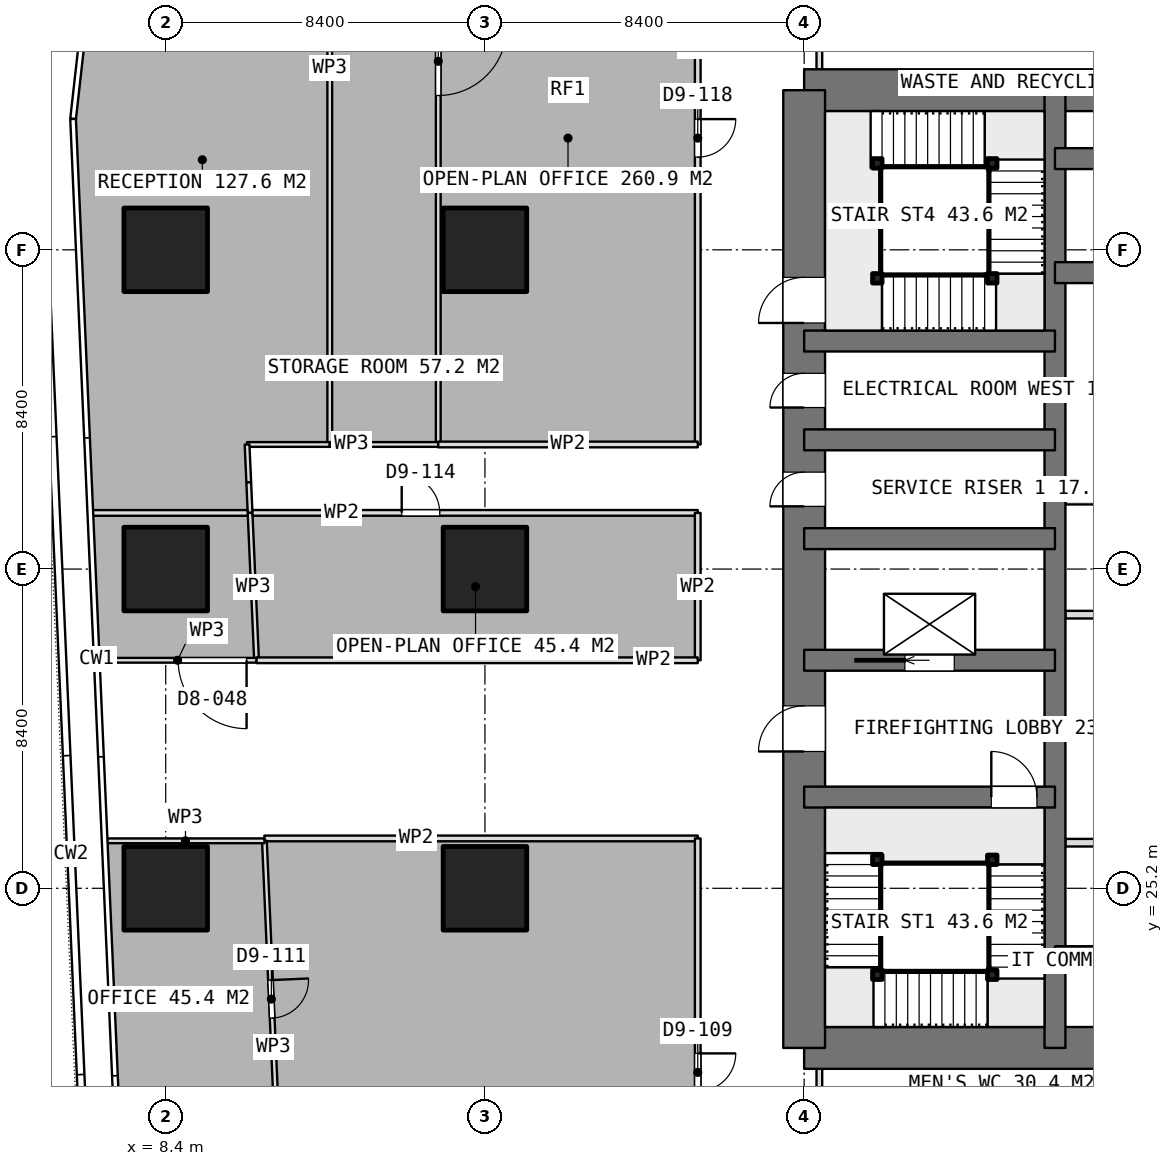
"""IFC4 building model, lengths in metres.
Left out: names, types, materials, properties, quantities, classifications, styles, units other than length and angle.
Written with IfcOpenShell. Run it as: python <this file> out.ifc"""

import sys

from ifc_helpers import new_model, si_unit, direction, frame, frame_2d, origin, origin_2d, place, context, subcontext, project, spatial, rectangle, extrude, element, fill, save


model = new_model("IFC4")
c1 = context("Model", 3, precision=1e-05, world=origin(), true_north=direction((0.0, 1.0)))
c2 = subcontext(c1, "Body", "Model", "MODEL_VIEW")
j1 = project(units=[si_unit("LENGTHUNIT", "METRE"), si_unit("PLANEANGLEUNIT", "RADIAN")], contexts=[c1])
p1 = place(None, origin())
s1 = spatial("IfcSite", under=j1, at=p1, CompositionType="ELEMENT")
p2 = place(p1, origin())
s2 = spatial("IfcBuilding", under=s1, at=p2, CompositionType="ELEMENT")
p3 = place(p2, frame((0.0, 0.0, 44.15)))
s3 = spatial("IfcBuildingStorey", under=s2, at=p3, CompositionType="ELEMENT", Elevation=44.15)
for number, where, z_axis, x_axis in (
    (1, (25.2, 21.0, 0.0), (0.0, 0.0, 1.0), (1.0, 0.0, 0.0)),
    (2, (25.2, 46.2, 0.0), (0.0, 0.0, 1.0), (1.0, 0.0, 0.0)),
):
    element("IfcWall", number, at=place(p3, frame(where, z_axis=z_axis, x_axis=x_axis)), inside=s3, PredefinedType="SHEAR", context=c2, shape_type="SweptSolid", body=[
        extrude(rectangle(XDim=10.4, YDim=1.1, at=frame_2d((5.2, 0.0))), origin(), (0.0, 0.0, 1.0), 3.75),
    ])
p4 = place(p3, frame((25.2, 21.0, 0.0), z_axis=(0.0, 0.0, 1.0), x_axis=(0.0, 1.0, 0.0)))
e3 = element("IfcWall", 3, at=p4, inside=s3, PredefinedType="SHEAR", context=c2, shape_type="SweptSolid", body=[
    extrude(rectangle(XDim=25.2, YDim=1.1, at=frame_2d((12.6, 0.0))), origin(), (0.0, 0.0, 1.0), 3.75),
])
p5 = place(p4, frame((7.8, 0.0, 0.0)))
e4 = element("IfcOpeningElement", 4, at=p5, cuts=e3, PredefinedType="OPENING", context=c2, shape_type="SweptSolid", body=[
    extrude(rectangle(XDim=1.2, YDim=2.1, at=frame_2d((0.6, 1.05))), frame((0.0, 0.56, 0.0), z_axis=(0.0, -1.0, 0.0), x_axis=(1.0, 0.0, 0.0)), (0.0, 0.0, 1.0), 1.12),
])
p6 = place(p4, frame((14.25, 0.0, 0.0)))
e5 = element("IfcOpeningElement", 5, at=p6, cuts=e3, PredefinedType="OPENING", context=c2, shape_type="SweptSolid", body=[
    extrude(rectangle(XDim=0.9, YDim=2.1, at=frame_2d((0.45, 1.05))), frame((0.0, 0.56, 0.0), z_axis=(0.0, -1.0, 0.0), x_axis=(1.0, 0.0, 0.0)), (0.0, 0.0, 1.0), 1.12),
])
p7 = place(p4, frame((16.85, 0.0, 0.0)))
e6 = element("IfcOpeningElement", 6, at=p7, cuts=e3, PredefinedType="OPENING", context=c2, shape_type="SweptSolid", body=[
    extrude(rectangle(XDim=0.9, YDim=2.1, at=frame_2d((0.45, 1.05))), frame((0.0, 0.56, 0.0), z_axis=(0.0, -1.0, 0.0), x_axis=(1.0, 0.0, 0.0)), (0.0, 0.0, 1.0), 1.12),
])
p8 = place(p4, frame((19.075, 0.0, 0.0)))
e7 = element("IfcOpeningElement", 7, at=p8, cuts=e3, PredefinedType="OPENING", context=c2, shape_type="SweptSolid", body=[
    extrude(rectangle(XDim=1.2, YDim=2.1, at=frame_2d((0.6, 1.05))), frame((0.0, 0.56, 0.0), z_axis=(0.0, -1.0, 0.0), x_axis=(1.0, 0.0, 0.0)), (0.0, 0.0, 1.0), 1.12),
])
p9 = place(p3, frame((31.8, 21.0, 0.0), z_axis=(0.0, 0.0, 1.0), x_axis=(0.0, 1.0, 0.0)))
e8 = element("IfcWall", 8, at=p9, inside=s3, PredefinedType="SHEAR", context=c2, shape_type="SweptSolid", body=[
    extrude(rectangle(XDim=25.2, YDim=0.55, at=frame_2d((12.6, 0.0))), origin(), (0.0, 0.0, 1.0), 3.75),
])
for number, where, z_axis, x_axis in (
    (9, (31.8, 23.4, 0.0), (0.0, 0.0, 1.0), (1.0, 0.0, 0.0)),
    (10, (31.8, 41.4, 0.0), (0.0, 0.0, 1.0), (1.0, 0.0, 0.0)),
    (11, (31.8, 44.4, 0.0), (0.0, 0.0, 1.0), (1.0, 0.0, 0.0)),
):
    element("IfcWall", number, at=place(p3, frame(where, z_axis=z_axis, x_axis=x_axis)), inside=s3, PredefinedType="SHEAR", context=c2, shape_type="SweptSolid", body=[
        extrude(rectangle(XDim=3.8, YDim=0.55, at=frame_2d((1.9, 0.0))), origin(), (0.0, 0.0, 1.0), 3.75),
    ])
p10 = place(p3, frame((25.2, 27.6, 0.0), z_axis=(0.0, 0.0, 1.0), x_axis=(1.0, 0.0, 0.0)))
e12 = element("IfcWall", 12, at=p10, inside=s3, PredefinedType="SHEAR", context=c2, shape_type="SweptSolid", body=[
    extrude(rectangle(XDim=6.6, YDim=0.55, at=frame_2d((3.3, 0.0))), origin(), (0.0, 0.0, 1.0), 3.75),
])
p11 = place(p10, frame((4.925, 0.0, 0.0)))
e13 = element("IfcOpeningElement", 13, at=p11, cuts=e12, PredefinedType="OPENING", context=c2, shape_type="SweptSolid", body=[
    extrude(rectangle(XDim=1.2, YDim=2.1, at=frame_2d((0.6, 1.05))), frame((0.0, 0.285, 0.0), z_axis=(0.0, -1.0, 0.0), x_axis=(1.0, 0.0, 0.0)), (0.0, 0.0, 1.0), 0.57),
])
p12 = place(p3, frame((25.2, 31.2, 0.0), z_axis=(0.0, 0.0, 1.0), x_axis=(1.0, 0.0, 0.0)))
e14 = element("IfcWall", 14, at=p12, inside=s3, PredefinedType="SHEAR", context=c2, shape_type="SweptSolid", body=[
    extrude(rectangle(XDim=6.6, YDim=0.55, at=frame_2d((3.3, 0.0))), origin(), (0.0, 0.0, 1.0), 3.75),
])
p13 = place(p12, frame((2.65, 0.0, 0.0)))
e15 = element("IfcOpeningElement", 15, at=p13, cuts=e14, PredefinedType="OPENING", context=c2, shape_type="SweptSolid", body=[
    extrude(rectangle(XDim=1.3, YDim=2.1, at=frame_2d((0.65, 1.05))), frame((0.0, 0.285, 0.0), z_axis=(0.0, -1.0, 0.0), x_axis=(1.0, 0.0, 0.0)), (0.0, 0.0, 1.0), 0.57),
])
for number, where, z_axis, x_axis in (
    (16, (25.2, 34.4, 0.0), (0.0, 0.0, 1.0), (1.0, 0.0, 0.0)),
    (17, (25.2, 37.0, 0.0), (0.0, 0.0, 1.0), (1.0, 0.0, 0.0)),
    (18, (25.2, 39.6, 0.0), (0.0, 0.0, 1.0), (1.0, 0.0, 0.0)),
):
    element("IfcWall", number, at=place(p3, frame(where, z_axis=z_axis, x_axis=x_axis)), inside=s3, PredefinedType="SHEAR", context=c2, shape_type="SweptSolid", body=[
        extrude(rectangle(XDim=6.6, YDim=0.55, at=frame_2d((3.3, 0.0))), origin(), (0.0, 0.0, 1.0), 3.75),
    ])
for number, where, z_axis, x_axis in (
    (19, (8.4, 25.2, 0.0), (0.0, 0.0, 1.0), (1.0, 0.0, 0.0)),
    (20, (8.4, 33.6, 0.0), (0.0, 0.0, 1.0), (1.0, 0.0, 0.0)),
    (21, (8.4, 42.0, 0.0), (0.0, 0.0, 1.0), (1.0, 0.0, 0.0)),
    (22, (16.8, 25.2, 0.0), (0.0, 0.0, 1.0), (1.0, 0.0, 0.0)),
    (23, (16.8, 33.6, 0.0), (0.0, 0.0, 1.0), (1.0, 0.0, 0.0)),
    (24, (16.8, 42.0, 0.0), (0.0, 0.0, 1.0), (1.0, 0.0, 0.0)),
):
    element("IfcColumn", number, at=place(p3, frame(where, z_axis=z_axis, x_axis=x_axis)), inside=s3, PredefinedType="COLUMN", context=c2, shape_type="SweptSolid", body=[
        extrude(rectangle(XDim=2.2, YDim=2.2, at=origin_2d()), origin(), (0.0, 0.0, 1.0), 3.75),
    ])
for number, where, z_axis, x_axis in (
    (25, (32.075, 26.4, 0.0), (0.0, 0.0, 1.0), (1.0, 0.0, 0.0)),
    (26, (32.075, 29.4, 0.0), (0.0, 0.0, 1.0), (1.0, 0.0, 0.0)),
    (27, (32.075, 32.4, 0.0), (0.0, 0.0, 1.0), (1.0, 0.0, 0.0)),
    (28, (32.075, 35.4, 0.0), (0.0, 0.0, 1.0), (1.0, 0.0, 0.0)),
    (29, (32.075, 38.4, 0.0), (0.0, 0.0, 1.0), (1.0, 0.0, 0.0)),
):
    element("IfcWall", number, at=place(p3, frame(where, z_axis=z_axis, x_axis=x_axis)), inside=s3, PredefinedType="PARTITIONING", context=c2, shape_type="SweptSolid", body=[
        extrude(rectangle(XDim=3.25, YDim=0.2, at=frame_2d((1.625, 0.0))), origin(), (0.0, 0.0, 1.0), 3.5),
    ])
for number, where, z_axis, x_axis in (
    (30, (25.6, 46.75, 0.0), (0.0, 0.0, 1.0), (0.0, 1.0, 0.0)),
    (31, (25.6, 17.875, 0.0), (0.0, 0.0, 1.0), (0.0, 1.0, 0.0)),
):
    element("IfcWall", number, at=place(p3, frame(where, z_axis=z_axis, x_axis=x_axis)), inside=s3, PredefinedType="PARTITIONING", context=c2, shape_type="SweptSolid", body=[
        extrude(rectangle(XDim=2.575, YDim=0.15, at=frame_2d((1.288, 0.0))), origin(), (0.0, 0.0, 1.0), 3.5),
    ])
p14 = place(p3, frame((12.717, 56.705, 0.0), z_axis=(0.0, 0.0, 1.0), x_axis=(0.0, -1.0, 0.0)))
e32 = element("IfcWall", 32, at=p14, inside=s3, PredefinedType="PARTITIONING", context=c2, shape_type="SweptSolid", body=[
    extrude(rectangle(XDim=19.827, YDim=0.125, at=frame_2d((9.914, 0.0))), origin(), (0.0, 0.0, 1.0), 3.5),
])
p15 = place(p3, frame((12.717, 36.878, 0.0), z_axis=(0.0, 0.0, 1.0), x_axis=(-1.0, 0.0, 0.0)))
e33 = element("IfcWall", 33, at=p15, inside=s3, PredefinedType="PARTITIONING", context=c2, shape_type="SweptSolid", body=[
    extrude(rectangle(XDim=2.176, YDim=0.125, at=frame_2d((1.088, 0.0))), origin(), (0.0, 0.0, 1.0), 3.5),
])
p16 = place(p3, frame((10.541, 36.878, 0.0), z_axis=(0.0, 0.0, 1.0), x_axis=(0.0440424538, -0.999029660352, 0.0)))
e34 = element("IfcWall", 34, at=p16, inside=s3, PredefinedType="PARTITIONING", context=c2, shape_type="SweptSolid", body=[
    extrude(rectangle(XDim=0.998, YDim=0.125, at=frame_2d((0.499, 0.0))), origin(), (0.0, 0.0, 1.0), 3.5),
])
p17 = place(p3, frame((10.585, 35.881, 0.0), z_axis=(0.0, 0.0, 1.0), x_axis=(0.043793560627, -0.999040601801, 0.0)))
e35 = element("IfcWall", 35, at=p17, inside=s3, PredefinedType="PARTITIONING", context=c2, shape_type="SweptSolid", body=[
    extrude(rectangle(XDim=0.803, YDim=0.125, at=frame_2d((0.401, 0.0))), origin(), (0.0, 0.0, 1.0), 3.5),
])
p18 = place(p3, frame((10.62, 35.079, 0.0), z_axis=(0.0, 0.0, 1.0), x_axis=(0.043761924835, -0.999041988074, 0.0)))
e36 = element("IfcWall", 36, at=p18, inside=s3, PredefinedType="PARTITIONING", context=c2, shape_type="SweptSolid", body=[
    extrude(rectangle(XDim=3.883, YDim=0.125, at=frame_2d((1.941, 0.0))), origin(), (0.0, 0.0, 1.0), 3.5),
])
p19 = place(p3, frame((10.79, 31.2, 0.0), z_axis=(0.0, 0.0, 1.0), x_axis=(-1.0, 0.0, 0.0)))
e37 = element("IfcWall", 37, at=p19, inside=s3, PredefinedType="PARTITIONING", context=c2, shape_type="SweptSolid", body=[
    extrude(rectangle(XDim=4.155, YDim=0.125, at=frame_2d((2.078, 0.0))), origin(), (0.0, 0.0, 1.0), 3.5),
])
p20 = place(p19, frame((0.262, 0.0, 0.0)))
e38 = element("IfcOpeningElement", 38, at=p20, cuts=e37, PredefinedType="OPENING", context=c2, shape_type="SweptSolid", body=[
    extrude(rectangle(XDim=1.8, YDim=2.1, at=frame_2d((0.9, 1.05))), frame((0.0, 0.073, 0.0), z_axis=(0.0, -1.0, 0.0), x_axis=(1.0, 0.0, 0.0)), (0.0, 0.0, 1.0), 0.145),
])
p21 = place(p3, frame((15.572, 57.043, 0.0), z_axis=(0.0, 0.0, 1.0), x_axis=(0.0, -1.0, 0.0)))
e39 = element("IfcWall", 39, at=p21, inside=s3, PredefinedType="PARTITIONING", context=c2, shape_type="SweptSolid", body=[
    extrude(rectangle(XDim=20.165, YDim=0.125, at=frame_2d((10.083, 0.0))), origin(), (0.0, 0.0, 1.0), 3.5),
])
p22 = place(p21, frame((9.183, 0.0, 0.0)))
e40 = element("IfcOpeningElement", 40, at=p22, cuts=e39, PredefinedType="OPENING", context=c2, shape_type="SweptSolid", body=[
    extrude(rectangle(XDim=1.8, YDim=2.1, at=frame_2d((0.9, 1.05))), frame((0.0, 0.073, 0.0), z_axis=(0.0, -1.0, 0.0), x_axis=(1.0, 0.0, 0.0)), (0.0, 0.0, 1.0), 0.145),
])
p23 = place(p3, frame((15.572, 36.878, 0.0), z_axis=(0.0, 0.0, 1.0), x_axis=(-1.0, 0.0, 0.0)))
e41 = element("IfcWall", 41, at=p23, inside=s3, PredefinedType="PARTITIONING", context=c2, shape_type="SweptSolid", body=[
    extrude(rectangle(XDim=2.855, YDim=0.125, at=frame_2d((1.427, 0.0))), origin(), (0.0, 0.0, 1.0), 3.5),
])
p24 = place(p3, frame((22.4, 53.0, 0.0), z_axis=(0.0, 0.0, 1.0), x_axis=(0.0, -1.0, 0.0)))
e42 = element("IfcWall", 42, at=p24, inside=s3, PredefinedType="PARTITIONING", context=c2, shape_type="SweptSolid", body=[
    extrude(rectangle(XDim=16.122, YDim=0.15, at=frame_2d((8.061, 0.0))), origin(), (0.0, 0.0, 1.0), 3.5),
])
p25 = place(p24, frame((7.561, 0.0, 0.0)))
e43 = element("IfcOpeningElement", 43, at=p25, cuts=e42, PredefinedType="OPENING", context=c2, shape_type="SweptSolid", body=[
    extrude(rectangle(XDim=1.0, YDim=2.1, at=frame_2d((0.5, 1.05))), frame((0.0, 0.085, 0.0), z_axis=(0.0, -1.0, 0.0), x_axis=(1.0, 0.0, 0.0)), (0.0, 0.0, 1.0), 0.17),
])
p26 = place(p3, frame((22.4, 36.878, 0.0), z_axis=(0.0, 0.0, 1.0), x_axis=(-1.0, 0.0, 0.0)))
e44 = element("IfcWall", 44, at=p26, inside=s3, PredefinedType="PARTITIONING", context=c2, shape_type="SweptSolid", body=[
    extrude(rectangle(XDim=6.828, YDim=0.15, at=frame_2d((3.414, 0.0))), origin(), (0.0, 0.0, 1.0), 3.5),
])
p27 = place(p3, frame((10.683, 35.078, 0.0), z_axis=(0.0, 0.0, 1.0), x_axis=(1.0, 0.0, 0.0)))
e45 = element("IfcWall", 45, at=p27, inside=s3, PredefinedType="PARTITIONING", context=c2, shape_type="SweptSolid", body=[
    extrude(rectangle(XDim=11.717, YDim=0.15, at=frame_2d((5.858, 0.0))), origin(), (0.0, 0.0, 1.0), 3.5),
])
p28 = place(p27, frame((3.927, 0.0, 0.0)))
e46 = element("IfcOpeningElement", 46, at=p28, cuts=e45, PredefinedType="OPENING", context=c2, shape_type="SweptSolid", body=[
    extrude(rectangle(XDim=1.0, YDim=2.1, at=frame_2d((0.5, 1.05))), frame((0.0, 0.085, 0.0), z_axis=(0.0, -1.0, 0.0), x_axis=(1.0, 0.0, 0.0)), (0.0, 0.0, 1.0), 0.17),
])
p29 = place(p3, frame((22.4, 35.078, 0.0), z_axis=(0.0, 0.0, 1.0), x_axis=(0.0, -1.0, 0.0)))
e47 = element("IfcWall", 47, at=p29, inside=s3, PredefinedType="PARTITIONING", context=c2, shape_type="SweptSolid", body=[
    extrude(rectangle(XDim=3.878, YDim=0.15, at=frame_2d((1.939, 0.0))), origin(), (0.0, 0.0, 1.0), 3.5),
])
p30 = place(p3, frame((22.4, 31.2, 0.0), z_axis=(0.0, 0.0, 1.0), x_axis=(-1.0, 0.0, 0.0)))
e48 = element("IfcWall", 48, at=p30, inside=s3, PredefinedType="PARTITIONING", context=c2, shape_type="SweptSolid", body=[
    extrude(rectangle(XDim=11.61, YDim=0.15, at=frame_2d((5.805, 0.0))), origin(), (0.0, 0.0, 1.0), 3.5),
])
p31 = place(p3, frame((10.558, 35.077, 0.0), z_axis=(0.0, 0.0, 1.0), x_axis=(-1.0, 0.0, 0.0)))
e49 = element("IfcWall", 49, at=p31, inside=s3, PredefinedType="PARTITIONING", context=c2, shape_type="SweptSolid", body=[
    extrude(rectangle(XDim=4.092, YDim=0.15, at=frame_2d((2.046, 0.0))), origin(), (0.0, 0.0, 1.0), 3.5),
])
p32 = place(p3, frame((10.997, 26.449, 0.0), z_axis=(0.0, 0.0, 1.0), x_axis=(0.043768823127, -0.999041685878, 0.0)))
e50 = element("IfcWall", 50, at=p32, inside=s3, PredefinedType="PARTITIONING", context=c2, shape_type="SweptSolid", body=[
    extrude(rectangle(XDim=8.339, YDim=0.125, at=frame_2d((4.169, 0.0))), origin(), (0.0, 0.0, 1.0), 3.5),
])
p33 = place(p32, frame((3.669, 0.0, 0.0)))
e51 = element("IfcOpeningElement", 51, at=p33, cuts=e50, PredefinedType="OPENING", context=c2, shape_type="SweptSolid", body=[
    extrude(rectangle(XDim=1.0, YDim=2.1, at=frame_2d((0.5, 1.05))), frame((0.0, 0.073, 0.0), z_axis=(0.0, -1.0, 0.0), x_axis=(1.0, 0.0, 0.0)), (0.0, 0.0, 1.0), 0.145),
])
p34 = place(p3, frame((6.843, 26.449, 0.0), z_axis=(0.0, 0.0, 1.0), x_axis=(1.0, 0.0, 0.0)))
e52 = element("IfcWall", 52, at=p34, inside=s3, PredefinedType="PARTITIONING", context=c2, shape_type="SweptSolid", body=[
    extrude(rectangle(XDim=4.154, YDim=0.125, at=frame_2d((2.077, 0.0))), origin(), (0.0, 0.0, 1.0), 3.5),
])
p35 = place(p3, frame((10.997, 26.512, 0.0), z_axis=(0.0, 0.0, 1.0), x_axis=(1.0, 0.0, 0.0)))
e53 = element("IfcWall", 53, at=p35, inside=s3, PredefinedType="PARTITIONING", context=c2, shape_type="SweptSolid", body=[
    extrude(rectangle(XDim=11.403, YDim=0.15, at=frame_2d((5.701, 0.0))), origin(), (0.0, 0.0, 1.0), 3.5),
])
p36 = place(p3, frame((22.4, 26.512, 0.0), z_axis=(0.0, 0.0, 1.0), x_axis=(0.0, -1.0, 0.0)))
e54 = element("IfcWall", 54, at=p36, inside=s3, PredefinedType="PARTITIONING", context=c2, shape_type="SweptSolid", body=[
    extrude(rectangle(XDim=12.312, YDim=0.15, at=frame_2d((6.156, 0.0))), origin(), (0.0, 0.0, 1.0), 3.5),
])
p37 = place(p36, frame((5.656, 0.0, 0.0)))
e55 = element("IfcOpeningElement", 55, at=p37, cuts=e54, PredefinedType="OPENING", context=c2, shape_type="SweptSolid", body=[
    extrude(rectangle(XDim=1.0, YDim=2.1, at=frame_2d((0.5, 1.05))), frame((0.0, 0.085, 0.0), z_axis=(0.0, -1.0, 0.0), x_axis=(1.0, 0.0, 0.0)), (0.0, 0.0, 1.0), 0.17),
])
for number, where, z_axis, x_axis in (
    (56, (30.15, 25.95, 0.0), (0.0, 0.0, 1.0), (1.0, 0.0, 0.0)),
    (57, (30.15, 22.925, 0.0), (0.0, 0.0, 1.0), (1.0, 0.0, 0.0)),
    (58, (27.125, 22.925, 0.0), (0.0, 0.0, 1.0), (1.0, 0.0, 0.0)),
    (59, (27.125, 25.95, 0.0), (0.0, 0.0, 1.0), (1.0, 0.0, 0.0)),
    (60, (27.125, 41.25, 0.0), (0.0, 0.0, 1.0), (1.0, 0.0, 0.0)),
    (61, (30.15, 41.25, 0.0), (0.0, 0.0, 1.0), (1.0, 0.0, 0.0)),
    (62, (30.15, 44.275, 0.0), (0.0, 0.0, 1.0), (1.0, 0.0, 0.0)),
    (63, (27.125, 44.275, 0.0), (0.0, 0.0, 1.0), (1.0, 0.0, 0.0)),
):
    element("IfcColumn", number, at=place(p3, frame(where, z_axis=z_axis, x_axis=x_axis)), inside=s3, PredefinedType="COLUMN", context=c2, shape_type="SweptSolid", body=[
        extrude(rectangle(XDim=0.25, YDim=0.25, at=origin_2d()), origin(), (0.0, 0.0, 1.0), 3.75),
    ])
p38 = place(p5, origin())
e64 = element("IfcDoor", 64, at=p38, inside=s3, OperationType="SINGLE_SWING_LEFT", PredefinedType="DOOR", context=c2, shape_type="SweptSolid", body=[
    extrude(rectangle(XDim=1.2, YDim=2.1, at=frame_2d((0.6, 1.05))), frame((0.0, 0.025, 0.0), z_axis=(0.0, -1.0, 0.0), x_axis=(1.0, 0.0, 0.0)), (0.0, 0.0, 1.0), 0.05),
])
fill(e4, e64)
p39 = place(p6, origin())
e65 = element("IfcDoor", 65, at=p39, inside=s3, OperationType="SINGLE_SWING_LEFT", PredefinedType="DOOR", context=c2, shape_type="SweptSolid", body=[
    extrude(rectangle(XDim=0.9, YDim=2.1, at=frame_2d((0.45, 1.05))), frame((0.0, 0.025, 0.0), z_axis=(0.0, -1.0, 0.0), x_axis=(1.0, 0.0, 0.0)), (0.0, 0.0, 1.0), 0.05),
])
fill(e5, e65)
p40 = place(p7, origin())
e66 = element("IfcDoor", 66, at=p40, inside=s3, OperationType="SINGLE_SWING_LEFT", PredefinedType="DOOR", context=c2, shape_type="SweptSolid", body=[
    extrude(rectangle(XDim=0.9, YDim=2.1, at=frame_2d((0.45, 1.05))), frame((0.0, 0.025, 0.0), z_axis=(0.0, -1.0, 0.0), x_axis=(1.0, 0.0, 0.0)), (0.0, 0.0, 1.0), 0.05),
])
fill(e6, e66)
p41 = place(p13, origin())
e67 = element("IfcDoor", 67, at=p41, inside=s3, OperationType="SLIDING_TO_LEFT", PredefinedType="USERDEFINED", context=c2, shape_type="SweptSolid", body=[
    extrude(rectangle(XDim=1.3, YDim=2.1, at=frame_2d((0.65, 1.05))), frame((0.0, 0.025, 0.0), z_axis=(0.0, -1.0, 0.0), x_axis=(1.0, 0.0, 0.0)), (0.0, 0.0, 1.0), 0.05),
])
fill(e15, e67)
p42 = place(p20, origin())
e68 = element("IfcDoor", 68, at=p42, inside=s3, OperationType="DOUBLE_DOOR_SINGLE_SWING", PredefinedType="DOOR", context=c2, shape_type="SweptSolid", body=[
    extrude(rectangle(XDim=1.8, YDim=2.1, at=frame_2d((0.9, 1.05))), frame((0.0, 0.025, 0.0), z_axis=(0.0, -1.0, 0.0), x_axis=(1.0, 0.0, 0.0)), (0.0, 0.0, 1.0), 0.05),
])
fill(e38, e68)
p43 = place(p22, origin())
e69 = element("IfcDoor", 69, at=p43, inside=s3, OperationType="DOUBLE_DOOR_SINGLE_SWING", PredefinedType="DOOR", context=c2, shape_type="SweptSolid", body=[
    extrude(rectangle(XDim=1.8, YDim=2.1, at=frame_2d((0.9, 1.05))), frame((0.0, 0.025, 0.0), z_axis=(0.0, -1.0, 0.0), x_axis=(1.0, 0.0, 0.0)), (0.0, 0.0, 1.0), 0.05),
])
fill(e40, e69)
p44 = place(p25, origin())
e70 = element("IfcDoor", 70, at=p44, inside=s3, OperationType="SINGLE_SWING_LEFT", PredefinedType="DOOR", context=c2, shape_type="SweptSolid", body=[
    extrude(rectangle(XDim=1.0, YDim=2.1, at=frame_2d((0.5, 1.05))), frame((0.0, 0.025, 0.0), z_axis=(0.0, -1.0, 0.0), x_axis=(1.0, 0.0, 0.0)), (0.0, 0.0, 1.0), 0.05),
])
fill(e43, e70)
p45 = place(p28, origin())
e71 = element("IfcDoor", 71, at=p45, inside=s3, OperationType="SINGLE_SWING_LEFT", PredefinedType="DOOR", context=c2, shape_type="SweptSolid", body=[
    extrude(rectangle(XDim=1.0, YDim=2.1, at=frame_2d((0.5, 1.05))), frame((0.0, 0.025, 0.0), z_axis=(0.0, -1.0, 0.0), x_axis=(1.0, 0.0, 0.0)), (0.0, 0.0, 1.0), 0.05),
])
fill(e46, e71)
p46 = place(p33, origin())
e72 = element("IfcDoor", 72, at=p46, inside=s3, OperationType="SINGLE_SWING_LEFT", PredefinedType="DOOR", context=c2, shape_type="SweptSolid", body=[
    extrude(rectangle(XDim=1.0, YDim=2.1, at=frame_2d((0.5, 1.05))), frame((0.0, 0.025, 0.0), z_axis=(0.0, -1.0, 0.0), x_axis=(1.0, 0.0, 0.0)), (0.0, 0.0, 1.0), 0.05),
])
fill(e51, e72)
p47 = place(p37, origin())
e73 = element("IfcDoor", 73, at=p47, inside=s3, OperationType="SINGLE_SWING_LEFT", PredefinedType="DOOR", context=c2, shape_type="SweptSolid", body=[
    extrude(rectangle(XDim=1.0, YDim=2.1, at=frame_2d((0.5, 1.05))), frame((0.0, 0.025, 0.0), z_axis=(0.0, -1.0, 0.0), x_axis=(1.0, 0.0, 0.0)), (0.0, 0.0, 1.0), 0.05),
])
fill(e55, e73)
p48 = place(p11, origin())
e74 = element("IfcDoor", 74, at=p48, inside=s3, OperationType="SINGLE_SWING_RIGHT", PredefinedType="DOOR", context=c2, shape_type="SweptSolid", body=[
    extrude(rectangle(XDim=1.2, YDim=2.1, at=frame_2d((0.6, 1.05))), frame((0.0, 0.025, 0.0), z_axis=(0.0, -1.0, 0.0), x_axis=(1.0, 0.0, 0.0)), (0.0, 0.0, 1.0), 0.05),
])
fill(e13, e74)
p49 = place(p8, origin())
e75 = element("IfcDoor", 75, at=p49, inside=s3, OperationType="SINGLE_SWING_RIGHT", PredefinedType="DOOR", context=c2, shape_type="SweptSolid", body=[
    extrude(rectangle(XDim=1.2, YDim=2.1, at=frame_2d((0.6, 1.05))), frame((0.0, 0.025, 0.0), z_axis=(0.0, -1.0, 0.0), x_axis=(1.0, 0.0, 0.0)), (0.0, 0.0, 1.0), 0.05),
])
fill(e7, e75)
save(model, sys.argv[1])
